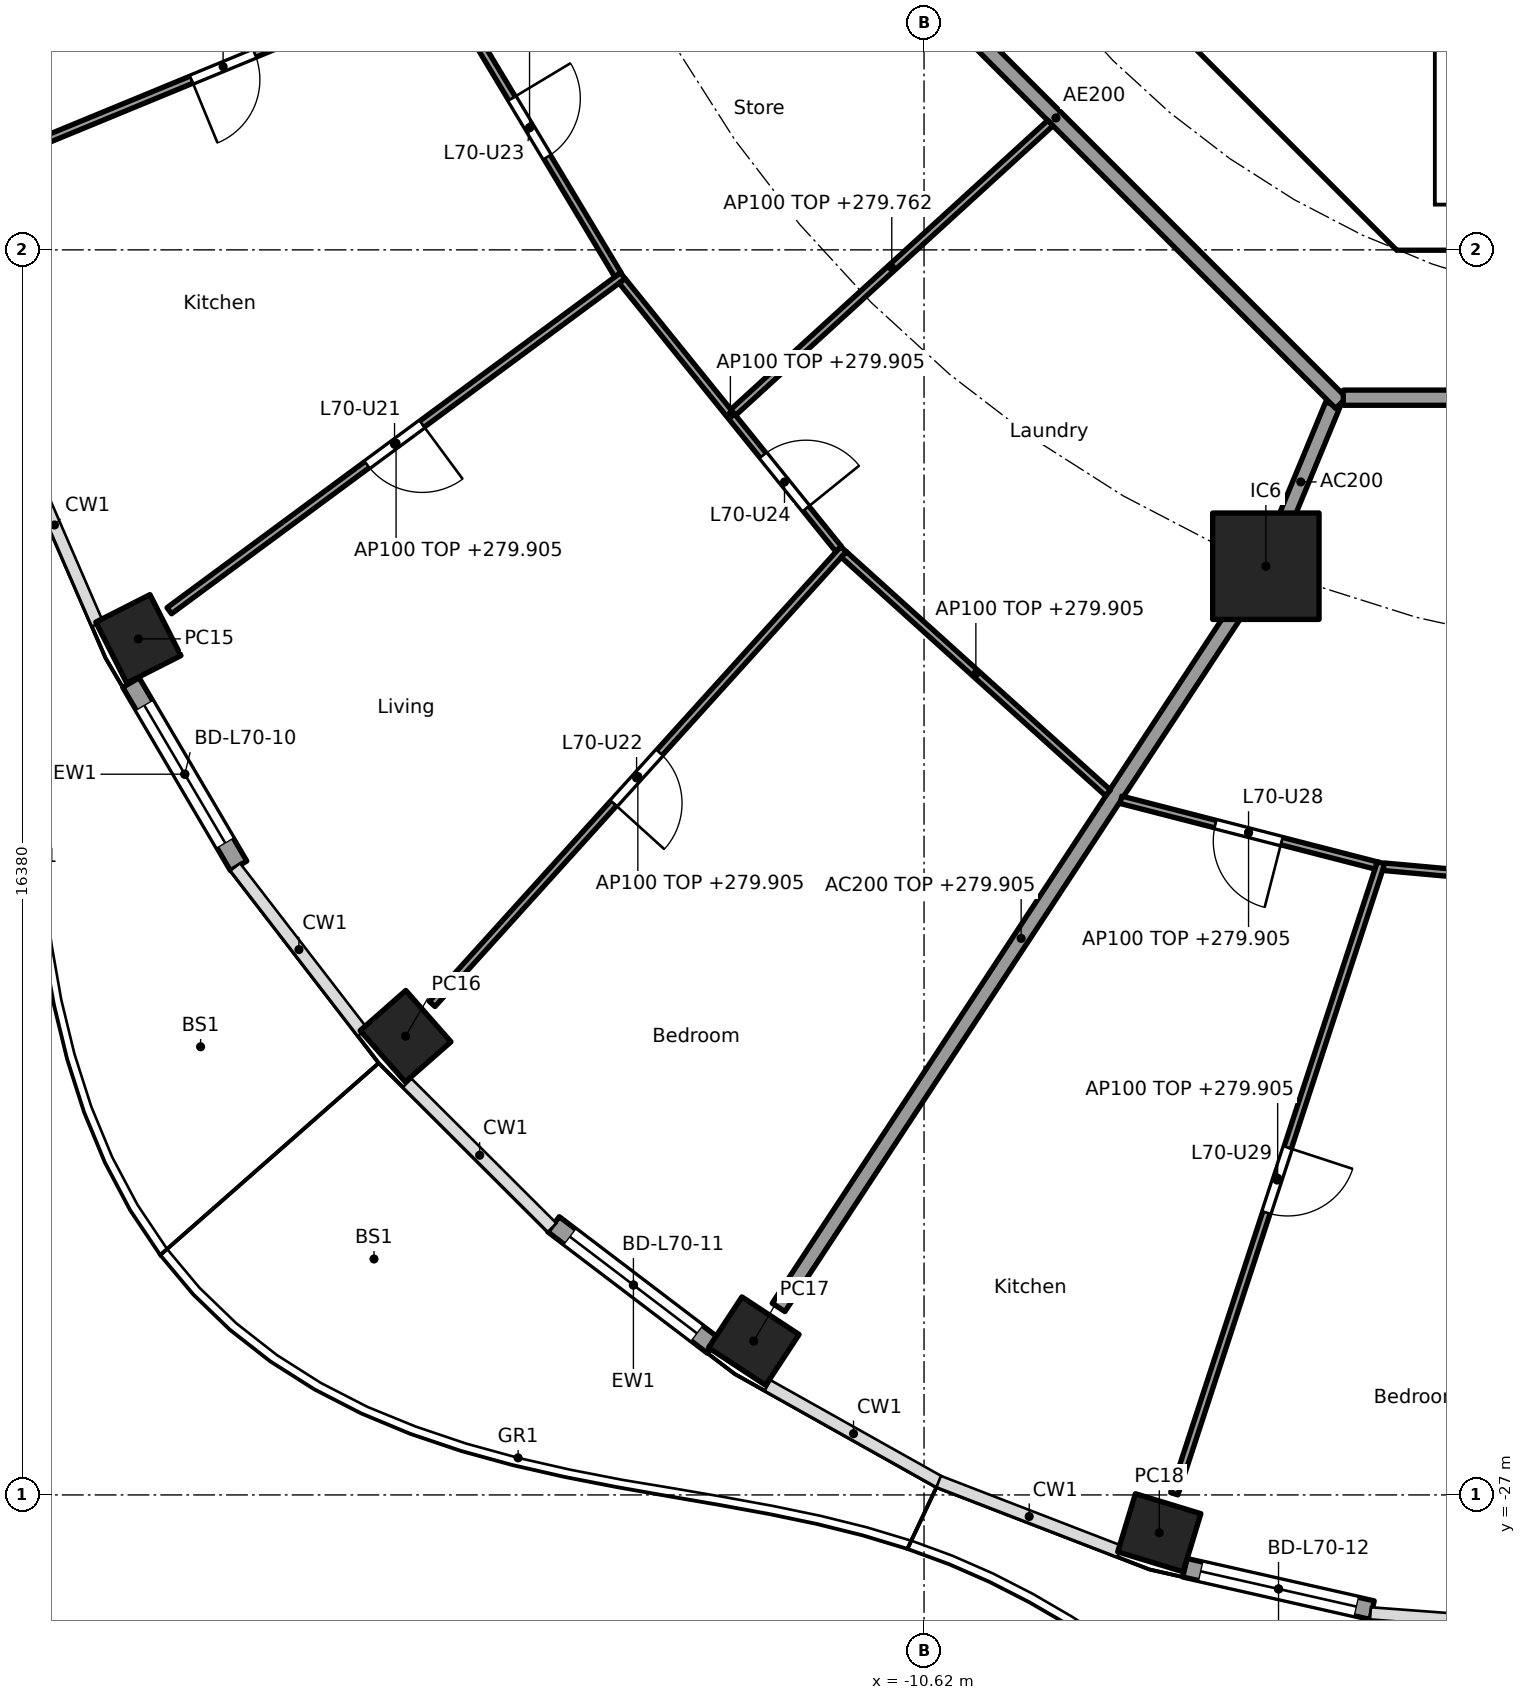
"""IFC4 building model, lengths in metres.
Left out: names, types, materials, properties, quantities, classifications, styles, units other than length and angle.
Written with IfcOpenShell. Run it as: python <this file> out.ifc"""

import sys

from ifc_helpers import new_model, si_unit, direction, frame, frame_2d, origin, origin_2d, place, context, subcontext, project, spatial, polyline, rectangle, hollow_rectangle, outline, extrude, element, fill, save


model = new_model("IFC4")
c1 = context("Model", 3, precision=1e-05, world=origin(), true_north=direction((0.0, 1.0)))
c2 = subcontext(c1, "Body", "Model", "MODEL_VIEW")
j1 = project(units=[si_unit("LENGTHUNIT", "METRE"), si_unit("PLANEANGLEUNIT", "RADIAN")], contexts=[c1])
p1 = place(None, origin())
s1 = spatial("IfcSite", under=j1, at=p1, CompositionType="ELEMENT")
p2 = place(p1, origin())
s2 = spatial("IfcBuilding", under=s1, at=p2, CompositionType="ELEMENT")
p3 = place(p2, frame((0.0, 0.0, 277.0)))
s3 = spatial("IfcBuildingStorey", under=s2, at=p3, CompositionType="ELEMENT", Elevation=277.0)
for number, where, z_axis, x_axis in (
    (1, (-20.957, -15.738, 0.0), (0.0, 0.0, 1.0), (0.452, -0.892, 0.0)),
    (2, (-17.441, -20.965, 0.0), (0.0, 0.0, 1.0), (0.66, -0.751, 0.0)),
    (3, (-12.86, -24.976, 0.0), (0.0, 0.0, 1.0), (0.836, -0.549, 0.0)),
    (4, (-7.525, -27.498, 0.0), (0.0, 0.0, 1.0), (0.957, -0.292, 0.0)),
):
    element("IfcColumn", number, at=place(p3, frame(where, z_axis=z_axis, x_axis=x_axis)), inside=s3, PredefinedType="COLUMN", context=c2, shape_type="SweptSolid", body=[
        extrude(hollow_rectangle(XDim=0.9, YDim=0.8, WallThickness=0.028, at=origin_2d()), origin(), (0.0, 0.0, 1.0), 3.7),
    ])
p4 = place(p3, frame((-6.123, -14.782, 0.0), z_axis=(0.0, 0.0, 1.0), x_axis=(1.0, 0.0, 0.0)))
e5 = element("IfcColumn", 5, at=p4, inside=s3, PredefinedType="COLUMN", context=c2, shape_type="SweptSolid", body=[
    extrude(rectangle(XDim=1.4, YDim=1.4, at=origin_2d()), origin(), (0.0, 0.0, 1.0), 3.7),
])
p5 = place(p3, frame((-19.638, -18.724, 0.0), z_axis=(0.0, 0.0, 1.0), x_axis=(-0.506371364425, 0.862315511452, 0.0)))
e6 = element("IfcWall", 6, at=p5, inside=s3, PredefinedType="SOLIDWALL", context=c2, shape_type="SweptSolid", body=[
    extrude(rectangle(XDim=2.796, YDim=0.25, at=frame_2d((1.398, 0.0))), origin(), (0.0, 0.0, 1.0), 3.44),
])
p6 = place(p5, frame((0.348, 0.0, 0.0)))
e7 = element("IfcOpeningElement", 7, at=p6, cuts=e6, PredefinedType="OPENING", context=c2, shape_type="SweptSolid", body=[
    extrude(rectangle(XDim=2.1, YDim=2.4, at=frame_2d((1.05, 1.2))), frame((0.0, 0.135, 0.0), z_axis=(0.0, -1.0, 0.0), x_axis=(1.0, 0.0, 0.0)), (0.0, 0.0, 1.0), 0.27),
])
p7 = place(p3, frame((-13.393, -25.037, 0.0), z_axis=(0.0, 0.0, 1.0), x_axis=(-0.796055284084, 0.605223912847, 0.0)))
e8 = element("IfcWall", 8, at=p7, inside=s3, PredefinedType="SOLIDWALL", context=c2, shape_type="SweptSolid", body=[
    extrude(rectangle(XDim=2.641, YDim=0.25, at=frame_2d((1.32, 0.0))), origin(), (0.0, 0.0, 1.0), 3.44),
])
p8 = place(p7, frame((0.27, 0.0, 0.0)))
e9 = element("IfcOpeningElement", 9, at=p8, cuts=e8, PredefinedType="OPENING", context=c2, shape_type="SweptSolid", body=[
    extrude(rectangle(XDim=2.1, YDim=2.4, at=frame_2d((1.05, 1.2))), frame((0.0, 0.135, 0.0), z_axis=(0.0, -1.0, 0.0), x_axis=(1.0, 0.0, 0.0)), (0.0, 0.0, 1.0), 0.27),
])
p9 = place(p3, frame((-4.725, -28.516, 0.0), z_axis=(0.0, 0.0, 1.0), x_axis=(-0.975319584032, 0.220797891756, 0.0)))
e10 = element("IfcWall", 10, at=p9, inside=s3, PredefinedType="SOLIDWALL", context=c2, shape_type="SweptSolid", body=[
    extrude(rectangle(XDim=2.525, YDim=0.25, at=frame_2d((1.263, 0.0))), origin(), (0.0, 0.0, 1.0), 3.44),
])
p10 = place(p9, frame((0.213, 0.0, 0.0)))
e11 = element("IfcOpeningElement", 11, at=p10, cuts=e10, PredefinedType="OPENING", context=c2, shape_type="SweptSolid", body=[
    extrude(rectangle(XDim=2.1, YDim=2.4, at=frame_2d((1.05, 1.2))), frame((0.0, 0.135, 0.0), z_axis=(0.0, -1.0, 0.0), x_axis=(1.0, 0.0, 0.0)), (0.0, 0.0, 1.0), 0.27),
])
p11 = place(p3, frame((-9.988, -4.613, 0.0), z_axis=(0.0, 0.0, 1.0), x_axis=(0.707106781187, -0.707106781187, 0.0)))
e12 = element("IfcWall", 12, at=p11, inside=s3, PredefinedType="SHEAR", context=c2, shape_type="SweptSolid", body=[
    extrude(rectangle(XDim=7.602, YDim=0.6, at=frame_2d((3.801, 0.0))), origin(), (0.0, 0.0, 1.0), 3.44),
])
p12 = place(p11, frame((6.151, 0.0, 0.0)))
e13 = element("IfcOpeningElement", 13, at=p12, cuts=e12, PredefinedType="OPENING", context=c2, shape_type="SweptSolid", body=[
    extrude(rectangle(XDim=1.1, YDim=2.1, at=frame_2d((0.55, 1.05))), frame((0.0, 0.31, 0.0), z_axis=(0.0, -1.0, 0.0), x_axis=(1.0, 0.0, 0.0)), (0.0, 0.0, 1.0), 0.62),
])
p13 = place(p3, origin())
e14 = element("IfcWall", 14, at=p13, inside=s3, PredefinedType="SHEAR", context=c2, shape_type="SweptSolid", body=[
    extrude(outline(polyline([(-4.152, -10.025), (4.152, -10.025), (4.401, -9.776), (4.825, -10.2), (4.401, -10.625), (-4.401, -10.625), (-4.825, -10.2), (-4.401, -9.776), (-4.152, -10.025)])), origin(), (0.0, 0.0, 1.0), 3.44),
])
p14 = place(p3, origin())
e15 = element("IfcWall", 15, at=p14, inside=s3, PredefinedType="SOLIDWALL", context=c2, shape_type="SweptSolid", body=[
    extrude(outline(polyline([(-3.9, -10.025), (-4.1, -10.025), (-4.1, -7.025), (-3.9, -7.025), (-3.9, -10.025)])), origin(), (0.0, 0.0, 1.0), 3.44),
])
p15 = place(p3, frame((-5.243, -12.657, 0.0), z_axis=(0.0, 0.0, 1.0), x_axis=(-0.382770106157, -0.923843626288, 0.0)))
e16 = element("IfcWall", 16, at=p15, inside=s3, PredefinedType="PARTITIONING", context=c2, shape_type="SweptSolid", body=[
    extrude(rectangle(XDim=2.199, YDim=0.2, at=frame_2d((1.1, 0.0))), origin(), (0.0, 0.0, 1.0), 3.44),
])
p16 = place(p3, frame((-6.151, -14.824, 0.0), z_axis=(0.0, 0.0, 1.0), x_axis=(-0.549345577828, -0.835595258556, 0.0)))
e17 = element("IfcWall", 17, at=p16, inside=s3, PredefinedType="PARTITIONING", context=c2, shape_type="SweptSolid", body=[
    extrude(rectangle(XDim=11.62, YDim=0.2, at=frame_2d((5.81, 0.0))), origin(), (0.0, 0.0, 1.0), 2.905),
])
p17 = place(p3, frame((-12.635, -5.134, 0.0), z_axis=(0.0, 0.0, 1.0), x_axis=(0.707106781187, -0.707106781187, 0.0)))
e18 = element("IfcWall", 18, at=p17, inside=s3, PredefinedType="PARTITIONING", context=c2, shape_type="SweptSolid", body=[
    extrude(rectangle(XDim=10.609, YDim=0.2, at=frame_2d((5.305, 0.0))), origin(), (0.0, 0.0, 1.0), 3.44),
])
p18 = place(p3, frame((-5.104, -12.565, 0.0), z_axis=(0.0, 0.0, 1.0), x_axis=(1.0, 0.0, 0.0)))
e19 = element("IfcWall", 19, at=p18, inside=s3, PredefinedType="PARTITIONING", context=c2, shape_type="SweptSolid", body=[
    extrude(rectangle(XDim=10.409, YDim=0.2, at=frame_2d((5.205, 0.0))), origin(), (0.0, 0.0, 1.0), 3.44),
])
p19 = place(p18, frame((5.906, 0.0, 0.0)))
e20 = element("IfcOpeningElement", 20, at=p19, cuts=e19, PredefinedType="OPENING", context=c2, shape_type="SweptSolid", body=[
    extrude(rectangle(XDim=1.0, YDim=2.1, at=frame_2d((0.5, 1.05))), frame((0.0, 0.11, 0.0), z_axis=(0.0, -1.0, 0.0), x_axis=(1.0, 0.0, 0.0)), (0.0, 0.0, 1.0), 0.22),
])
p20 = place(p3, frame((-14.828, -6.142, 0.0), z_axis=(0.0, 0.0, 1.0), x_axis=(-0.924478087429, -0.381235184451, 0.0)))
e21 = element("IfcWall", 21, at=p20, inside=s3, PredefinedType="PARTITIONING", context=c2, shape_type="SweptSolid", body=[
    extrude(rectangle(XDim=8.499, YDim=0.1, at=frame_2d((4.25, 0.0))), origin(), (0.0, 0.0, 1.0), 2.905),
])
p21 = place(p20, frame((4.973, 0.0, 0.0)))
e22 = element("IfcOpeningElement", 22, at=p21, cuts=e21, PredefinedType="OPENING", context=c2, shape_type="SweptSolid", body=[
    extrude(rectangle(XDim=0.9, YDim=2.1, at=frame_2d((0.45, 1.05))), frame((0.0, 0.06, 0.0), z_axis=(0.0, -1.0, 0.0), x_axis=(1.0, 0.0, 0.0)), (0.0, 0.0, 1.0), 0.12),
])
p22 = place(p3, frame((-16.972, -7.08, 0.0), z_axis=(0.0, 0.0, 1.0), x_axis=(0.514989049311, -0.857196756346, 0.0)))
e23 = element("IfcWall", 23, at=p22, inside=s3, PredefinedType="PARTITIONING", context=c2, shape_type="SweptSolid", body=[
    extrude(rectangle(XDim=4.512, YDim=0.1, at=frame_2d((2.256, 0.0))), origin(), (0.0, 0.0, 1.0), 2.905),
])
p23 = place(p22, frame((1.806, 0.0, 0.0)))
e24 = element("IfcOpeningElement", 24, at=p23, cuts=e23, PredefinedType="OPENING", context=c2, shape_type="SweptSolid", body=[
    extrude(rectangle(XDim=0.9, YDim=2.1, at=frame_2d((0.45, 1.05))), frame((0.0, 0.06, 0.0), z_axis=(0.0, -1.0, 0.0), x_axis=(1.0, 0.0, 0.0)), (0.0, 0.0, 1.0), 0.12),
])
p24 = place(p3, frame((-14.582, -10.96, 0.0), z_axis=(0.0, 0.0, 1.0), x_axis=(-0.804405200554, -0.594081032623, 0.0)))
e25 = element("IfcWall", 25, at=p24, inside=s3, PredefinedType="PARTITIONING", context=c2, shape_type="SweptSolid", body=[
    extrude(rectangle(XDim=7.418, YDim=0.1, at=frame_2d((3.709, 0.0))), origin(), (0.0, 0.0, 1.0), 2.905),
])
p25 = place(p24, frame((3.284, 0.0, 0.0)))
e26 = element("IfcOpeningElement", 26, at=p25, cuts=e25, PredefinedType="OPENING", context=c2, shape_type="SweptSolid", body=[
    extrude(rectangle(XDim=0.9, YDim=2.1, at=frame_2d((0.45, 1.05))), frame((0.0, 0.06, 0.0), z_axis=(0.0, -1.0, 0.0), x_axis=(1.0, 0.0, 0.0)), (0.0, 0.0, 1.0), 0.12),
])
p26 = place(p3, frame((-14.591, -11.029, 0.0), z_axis=(0.0, 0.0, 1.0), x_axis=(0.628170338674, -0.778075848237, 0.0)))
e27 = element("IfcWall", 27, at=p26, inside=s3, PredefinedType="PARTITIONING", context=c2, shape_type="SweptSolid", body=[
    extrude(rectangle(XDim=4.532, YDim=0.1, at=frame_2d((2.266, 0.0))), origin(), (0.0, 0.0, 1.0), 2.905),
])
p27 = place(p26, frame((2.949, 0.0, 0.0)))
e28 = element("IfcOpeningElement", 28, at=p27, cuts=e27, PredefinedType="OPENING", context=c2, shape_type="SweptSolid", body=[
    extrude(rectangle(XDim=0.9, YDim=2.1, at=frame_2d((0.45, 1.05))), frame((0.0, 0.06, 0.0), z_axis=(0.0, -1.0, 0.0), x_axis=(1.0, 0.0, 0.0)), (0.0, 0.0, 1.0), 0.12),
])
p28 = place(p3, frame((-8.958, -8.952, 0.0), z_axis=(0.0, 0.0, 1.0), x_axis=(-0.73876526954, -0.673962815385, 0.0)))
e29 = element("IfcWall", 29, at=p28, inside=s3, PredefinedType="PARTITIONING", context=c2, shape_type="SweptSolid", body=[
    extrude(rectangle(XDim=5.647, YDim=0.1, at=frame_2d((2.824, 0.0))), origin(), (0.0, 0.0, 1.0), 2.762),
])
p29 = place(p3, frame((-11.679, -14.557, 0.0), z_axis=(0.0, 0.0, 1.0), x_axis=(-0.670800011545, -0.741638284146, 0.0)))
e30 = element("IfcWall", 30, at=p29, inside=s3, PredefinedType="PARTITIONING", context=c2, shape_type="SweptSolid", body=[
    extrude(rectangle(XDim=8.068, YDim=0.1, at=frame_2d((4.034, 0.0))), origin(), (0.0, 0.0, 1.0), 2.905),
])
p30 = place(p29, frame((3.609, 0.0, 0.0)))
e31 = element("IfcOpeningElement", 31, at=p30, cuts=e30, PredefinedType="OPENING", context=c2, shape_type="SweptSolid", body=[
    extrude(rectangle(XDim=0.9, YDim=2.1, at=frame_2d((0.45, 1.05))), frame((0.0, 0.06, 0.0), z_axis=(0.0, -1.0, 0.0), x_axis=(1.0, 0.0, 0.0)), (0.0, 0.0, 1.0), 0.12),
])
p31 = place(p3, frame((-11.676, -14.628, 0.0), z_axis=(0.0, 0.0, 1.0), x_axis=(0.74245829867, -0.669892285921, 0.0)))
e32 = element("IfcWall", 32, at=p31, inside=s3, PredefinedType="PARTITIONING", context=c2, shape_type="SweptSolid", body=[
    extrude(rectangle(XDim=4.68, YDim=0.1, at=frame_2d((2.34, 0.0))), origin(), (0.0, 0.0, 1.0), 2.905),
])
p32 = place(p3, frame((-8.03, -17.854, 0.0), z_axis=(0.0, 0.0, 1.0), x_axis=(0.968441967324, -0.249239154077, 0.0)))
e33 = element("IfcWall", 33, at=p32, inside=s3, PredefinedType="PARTITIONING", context=c2, shape_type="SweptSolid", body=[
    extrude(rectangle(XDim=3.468, YDim=0.1, at=frame_2d((1.734, 0.0))), origin(), (0.0, 0.0, 1.0), 2.905),
])
p33 = place(p32, frame((1.284, 0.0, 0.0)))
e34 = element("IfcOpeningElement", 34, at=p33, cuts=e33, PredefinedType="OPENING", context=c2, shape_type="SweptSolid", body=[
    extrude(rectangle(XDim=0.9, YDim=2.1, at=frame_2d((0.45, 1.05))), frame((0.0, 0.06, 0.0), z_axis=(0.0, -1.0, 0.0), x_axis=(1.0, 0.0, 0.0)), (0.0, 0.0, 1.0), 0.12),
])
p34 = place(p3, frame((-4.608, -18.684, 0.0), z_axis=(0.0, 0.0, 1.0), x_axis=(-0.311419102378, -0.95027266754, 0.0)))
e35 = element("IfcWall", 35, at=p34, inside=s3, PredefinedType="PARTITIONING", context=c2, shape_type="SweptSolid", body=[
    extrude(rectangle(XDim=8.735, YDim=0.1, at=frame_2d((4.367, 0.0))), origin(), (0.0, 0.0, 1.0), 2.905),
])
p35 = place(p34, frame((3.942, 0.0, 0.0)))
e36 = element("IfcOpeningElement", 36, at=p35, cuts=e35, PredefinedType="OPENING", context=c2, shape_type="SweptSolid", body=[
    extrude(rectangle(XDim=0.9, YDim=2.1, at=frame_2d((0.45, 1.05))), frame((0.0, 0.06, 0.0), z_axis=(0.0, -1.0, 0.0), x_axis=(1.0, 0.0, 0.0)), (0.0, 0.0, 1.0), 0.12),
])
p36 = place(p3, frame((-4.573, -18.736, 0.0), z_axis=(0.0, 0.0, 1.0), x_axis=(0.995986472869, -0.089503887414, 0.0)))
e37 = element("IfcWall", 37, at=p36, inside=s3, PredefinedType="PARTITIONING", context=c2, shape_type="SweptSolid", body=[
    extrude(rectangle(XDim=3.819, YDim=0.1, at=frame_2d((1.909, 0.0))), origin(), (0.0, 0.0, 1.0), 2.905),
])
p37 = place(p6, origin())
e38 = element("IfcDoor", 38, at=p37, inside=s3, OperationType="SLIDING_TO_LEFT", PredefinedType="DOOR", context=c2, shape_type="SweptSolid", body=[
    extrude(rectangle(XDim=2.1, YDim=2.4, at=frame_2d((1.05, 1.2))), frame((0.0, 0.025, 0.0), z_axis=(0.0, -1.0, 0.0), x_axis=(1.0, 0.0, 0.0)), (0.0, 0.0, 1.0), 0.05),
])
fill(e7, e38)
p38 = place(p8, origin())
e39 = element("IfcDoor", 39, at=p38, inside=s3, OperationType="SLIDING_TO_LEFT", PredefinedType="DOOR", context=c2, shape_type="SweptSolid", body=[
    extrude(rectangle(XDim=2.1, YDim=2.4, at=frame_2d((1.05, 1.2))), frame((0.0, 0.025, 0.0), z_axis=(0.0, -1.0, 0.0), x_axis=(1.0, 0.0, 0.0)), (0.0, 0.0, 1.0), 0.05),
])
fill(e9, e39)
p39 = place(p10, origin())
e40 = element("IfcDoor", 40, at=p39, inside=s3, OperationType="SLIDING_TO_LEFT", PredefinedType="DOOR", context=c2, shape_type="SweptSolid", body=[
    extrude(rectangle(XDim=2.1, YDim=2.4, at=frame_2d((1.05, 1.2))), frame((0.0, 0.025, 0.0), z_axis=(0.0, -1.0, 0.0), x_axis=(1.0, 0.0, 0.0)), (0.0, 0.0, 1.0), 0.05),
])
fill(e11, e40)
p40 = place(p12, origin())
e41 = element("IfcDoor", 41, at=p40, inside=s3, OperationType="SINGLE_SWING_RIGHT", PredefinedType="DOOR", context=c2, shape_type="SweptSolid", body=[
    extrude(rectangle(XDim=1.1, YDim=2.1, at=frame_2d((0.55, 1.05))), frame((0.0, 0.025, 0.0), z_axis=(0.0, -1.0, 0.0), x_axis=(1.0, 0.0, 0.0)), (0.0, 0.0, 1.0), 0.05),
])
fill(e13, e41)
p41 = place(p21, origin())
e42 = element("IfcDoor", 42, at=p41, inside=s3, OperationType="SINGLE_SWING_RIGHT", PredefinedType="DOOR", context=c2, shape_type="SweptSolid", body=[
    extrude(rectangle(XDim=0.9, YDim=2.1, at=frame_2d((0.45, 1.05))), frame((0.0, 0.025, 0.0), z_axis=(0.0, -1.0, 0.0), x_axis=(1.0, 0.0, 0.0)), (0.0, 0.0, 1.0), 0.05),
])
fill(e22, e42)
p42 = place(p25, origin())
e43 = element("IfcDoor", 43, at=p42, inside=s3, OperationType="SINGLE_SWING_LEFT", PredefinedType="DOOR", context=c2, shape_type="SweptSolid", body=[
    extrude(rectangle(XDim=0.9, YDim=2.1, at=frame_2d((0.45, 1.05))), frame((0.0, 0.025, 0.0), z_axis=(0.0, -1.0, 0.0), x_axis=(1.0, 0.0, 0.0)), (0.0, 0.0, 1.0), 0.05),
])
fill(e26, e43)
p43 = place(p30, origin())
e44 = element("IfcDoor", 44, at=p43, inside=s3, OperationType="SINGLE_SWING_RIGHT", PredefinedType="DOOR", context=c2, shape_type="SweptSolid", body=[
    extrude(rectangle(XDim=0.9, YDim=2.1, at=frame_2d((0.45, 1.05))), frame((0.0, 0.025, 0.0), z_axis=(0.0, -1.0, 0.0), x_axis=(1.0, 0.0, 0.0)), (0.0, 0.0, 1.0), 0.05),
])
fill(e31, e44)
p44 = place(p23, origin())
e45 = element("IfcDoor", 45, at=p44, inside=s3, OperationType="SINGLE_SWING_LEFT", PredefinedType="DOOR", context=c2, shape_type="SweptSolid", body=[
    extrude(rectangle(XDim=0.9, YDim=2.1, at=frame_2d((0.45, 1.05))), frame((0.0, 0.025, 0.0), z_axis=(0.0, -1.0, 0.0), x_axis=(1.0, 0.0, 0.0)), (0.0, 0.0, 1.0), 0.05),
])
fill(e24, e45)
p45 = place(p27, origin())
e46 = element("IfcDoor", 46, at=p45, inside=s3, OperationType="SINGLE_SWING_RIGHT", PredefinedType="DOOR", context=c2, shape_type="SweptSolid", body=[
    extrude(rectangle(XDim=0.9, YDim=2.1, at=frame_2d((0.45, 1.05))), frame((0.0, 0.025, 0.0), z_axis=(0.0, -1.0, 0.0), x_axis=(1.0, 0.0, 0.0)), (0.0, 0.0, 1.0), 0.05),
])
fill(e28, e46)
p46 = place(p33, frame((0.9, 0.0, 0.0), x_axis=(-1.0, 0.0, 0.0)))
e47 = element("IfcDoor", 47, at=p46, inside=s3, OperationType="SINGLE_SWING_LEFT", PredefinedType="DOOR", context=c2, shape_type="SweptSolid", body=[
    extrude(rectangle(XDim=0.9, YDim=2.1, at=frame_2d((0.45, 1.05))), frame((0.0, 0.025, 0.0), z_axis=(0.0, -1.0, 0.0), x_axis=(1.0, 0.0, 0.0)), (0.0, 0.0, 1.0), 0.05),
])
fill(e34, e47)
p47 = place(p35, origin())
e48 = element("IfcDoor", 48, at=p47, inside=s3, OperationType="SINGLE_SWING_LEFT", PredefinedType="DOOR", context=c2, shape_type="SweptSolid", body=[
    extrude(rectangle(XDim=0.9, YDim=2.1, at=frame_2d((0.45, 1.05))), frame((0.0, 0.025, 0.0), z_axis=(0.0, -1.0, 0.0), x_axis=(1.0, 0.0, 0.0)), (0.0, 0.0, 1.0), 0.05),
])
fill(e36, e48)
save(model, sys.argv[1])
